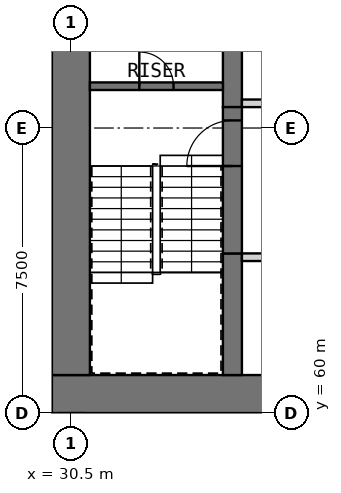
"""IFC4 building model, lengths in metres.
Left out: names, types, materials, properties, quantities, classifications, styles, units other than length and angle.
Written with IfcOpenShell. Run it as: python <this file> out.ifc"""

import sys

from ifc_helpers import new_model, si_unit, direction, frame, frame_2d, origin, place, context, subcontext, project, spatial, rectangle, extrude, element, fill, save


model = new_model("IFC4")
c1 = context("Model", 3, precision=1e-05, world=origin(), true_north=direction((0.0, 1.0)))
c2 = subcontext(c1, "Body", "Model", "MODEL_VIEW")
j1 = project(units=[si_unit("LENGTHUNIT", "METRE"), si_unit("PLANEANGLEUNIT", "RADIAN")], contexts=[c1])
p1 = place(None, origin())
s1 = spatial("IfcSite", under=j1, at=p1, CompositionType="ELEMENT")
p2 = place(p1, origin())
s2 = spatial("IfcBuilding", under=s1, at=p2, CompositionType="ELEMENT")
p3 = place(p2, frame((0.0, 0.0, 44.8)))
s3 = spatial("IfcBuildingStorey", under=s2, at=p3, CompositionType="ELEMENT", Elevation=44.8)
p4 = place(p3, frame((30.0, 60.5, 0.0), z_axis=(0.0, 0.0, 1.0), x_axis=(1.0, 0.0, 0.0)))
e1 = element("IfcWall", 1, at=p4, inside=s3, PredefinedType="SHEAR", context=c2, shape_type="SweptSolid", body=[
    extrude(rectangle(XDim=30.0, YDim=1.0, at=frame_2d((15.0, 0.0))), origin(), (0.0, 0.0, 1.0), 3.6),
])
p5 = place(p4, frame((21.9, 0.0, 0.0)))
e2 = element("IfcOpeningElement", 2, at=p5, cuts=e1, PredefinedType="OPENING", context=c2, shape_type="SweptSolid", body=[
    extrude(rectangle(XDim=1.8, YDim=2.1, at=frame_2d((0.9, 1.05))), frame((0.0, 0.51, 0.0), z_axis=(0.0, -1.0, 0.0), x_axis=(1.0, 0.0, 0.0)), (0.0, 0.0, 1.0), 1.02),
])
p6 = place(p4, frame((26.5, 0.0, 0.0)))
e3 = element("IfcOpeningElement", 3, at=p6, cuts=e1, PredefinedType="OPENING", context=c2, shape_type="SweptSolid", body=[
    extrude(rectangle(XDim=1.2, YDim=2.1, at=frame_2d((0.6, 1.05))), frame((0.0, 0.51, 0.0), z_axis=(0.0, -1.0, 0.0), x_axis=(1.0, 0.0, 0.0)), (0.0, 0.0, 1.0), 1.02),
])
p7 = place(p3, frame((30.5, 61.0, 0.0), z_axis=(0.0, 0.0, 1.0), x_axis=(0.0, 1.0, 0.0)))
e4 = element("IfcWall", 4, at=p7, inside=s3, PredefinedType="SHEAR", context=c2, shape_type="SweptSolid", body=[
    extrude(rectangle(XDim=20.5, YDim=1.0, at=frame_2d((10.25, 0.0))), origin(), (0.0, 0.0, 1.0), 3.6),
])
p8 = place(p3, frame((34.75, 61.0, 0.0), z_axis=(0.0, 0.0, 1.0), x_axis=(0.0, 1.0, 0.0)))
e5 = element("IfcWall", 5, at=p8, inside=s3, PredefinedType="SHEAR", context=c2, shape_type="SweptSolid", body=[
    extrude(rectangle(XDim=3.2, YDim=0.5, at=frame_2d((1.6, 0.0))), origin(), (0.0, 0.0, 1.0), 3.6),
])
p9 = place(p3, frame((34.75, 68.05, 0.0), z_axis=(0.0, 0.0, 1.0), x_axis=(0.0, 1.0, 0.0)))
e6 = element("IfcWall", 6, at=p9, inside=s3, PredefinedType="SHEAR", context=c2, shape_type="SweptSolid", body=[
    extrude(rectangle(XDim=6.4, YDim=0.5, at=frame_2d((3.2, 0.0))), origin(), (0.0, 0.0, 1.0), 3.6),
])
p10 = place(p3, frame((35.0, 64.1, 0.0), z_axis=(0.0, 0.0, 1.0), x_axis=(1.0, 0.0, 0.0)))
e7 = element("IfcWall", 7, at=p10, inside=s3, PredefinedType="SOLIDWALL", context=c2, shape_type="SweptSolid", body=[
    extrude(rectangle(XDim=13.0, YDim=0.2, at=frame_2d((6.5, 0.0))), origin(), (0.0, 0.0, 1.0), 3.6),
])
p11 = place(p10, frame((0.75, 0.0, 0.0)))
e8 = element("IfcOpeningElement", 8, at=p11, cuts=e7, PredefinedType="OPENING", context=c2, shape_type="SweptSolid", body=[
    extrude(rectangle(XDim=1.1, YDim=2.1, at=frame_2d((0.55, 1.05))), frame((0.0, 0.11, 0.0), z_axis=(0.0, -1.0, 0.0), x_axis=(1.0, 0.0, 0.0)), (0.0, 0.0, 1.0), 0.22),
])
p12 = place(p10, frame((3.35, 0.0, 0.0)))
e9 = element("IfcOpeningElement", 9, at=p12, cuts=e7, PredefinedType="OPENING", context=c2, shape_type="SweptSolid", body=[
    extrude(rectangle(XDim=1.1, YDim=2.1, at=frame_2d((0.55, 1.05))), frame((0.0, 0.11, 0.0), z_axis=(0.0, -1.0, 0.0), x_axis=(1.0, 0.0, 0.0)), (0.0, 0.0, 1.0), 0.22),
])
p13 = place(p10, frame((5.95, 0.0, 0.0)))
e10 = element("IfcOpeningElement", 10, at=p13, cuts=e7, PredefinedType="OPENING", context=c2, shape_type="SweptSolid", body=[
    extrude(rectangle(XDim=1.1, YDim=2.1, at=frame_2d((0.55, 1.05))), frame((0.0, 0.11, 0.0), z_axis=(0.0, -1.0, 0.0), x_axis=(1.0, 0.0, 0.0)), (0.0, 0.0, 1.0), 0.22),
])
p14 = place(p10, frame((8.55, 0.0, 0.0)))
e11 = element("IfcOpeningElement", 11, at=p14, cuts=e7, PredefinedType="OPENING", context=c2, shape_type="SweptSolid", body=[
    extrude(rectangle(XDim=1.1, YDim=2.1, at=frame_2d((0.55, 1.05))), frame((0.0, 0.11, 0.0), z_axis=(0.0, -1.0, 0.0), x_axis=(1.0, 0.0, 0.0)), (0.0, 0.0, 1.0), 0.22),
])
p15 = place(p10, frame((11.15, 0.0, 0.0)))
e12 = element("IfcOpeningElement", 12, at=p15, cuts=e7, PredefinedType="OPENING", context=c2, shape_type="SweptSolid", body=[
    extrude(rectangle(XDim=1.1, YDim=2.1, at=frame_2d((0.55, 1.05))), frame((0.0, 0.11, 0.0), z_axis=(0.0, -1.0, 0.0), x_axis=(1.0, 0.0, 0.0)), (0.0, 0.0, 1.0), 0.22),
])
p16 = place(p3, frame((35.0, 68.15, 0.0), z_axis=(0.0, 0.0, 1.0), x_axis=(1.0, 0.0, 0.0)))
e13 = element("IfcWall", 13, at=p16, inside=s3, PredefinedType="SOLIDWALL", context=c2, shape_type="SweptSolid", body=[
    extrude(rectangle(XDim=13.0, YDim=0.2, at=frame_2d((6.5, 0.0))), origin(), (0.0, 0.0, 1.0), 3.6),
])
p17 = place(p16, frame((0.75, 0.0, 0.0)))
e14 = element("IfcOpeningElement", 14, at=p17, cuts=e13, PredefinedType="OPENING", context=c2, shape_type="SweptSolid", body=[
    extrude(rectangle(XDim=1.1, YDim=2.1, at=frame_2d((0.55, 1.05))), frame((0.0, 0.11, 0.0), z_axis=(0.0, -1.0, 0.0), x_axis=(1.0, 0.0, 0.0)), (0.0, 0.0, 1.0), 0.22),
])
p18 = place(p3, frame((34.75, 64.2, 0.0), z_axis=(0.0, 0.0, 1.0), x_axis=(0.0, 1.0, 0.0)))
e15 = element("IfcWall", 15, at=p18, inside=s3, PredefinedType="SOLIDWALL", context=c2, shape_type="SweptSolid", body=[
    extrude(rectangle(XDim=3.85, YDim=0.5, at=frame_2d((1.925, 0.0))), origin(), (0.0, 0.0, 1.0), 2.4),
])
p19 = place(p18, frame((2.3, 0.0, 0.0)))
e16 = element("IfcOpeningElement", 16, at=p19, cuts=e15, PredefinedType="OPENING", context=c2, shape_type="SweptSolid", body=[
    extrude(rectangle(XDim=1.2, YDim=2.1, at=frame_2d((0.6, 1.05))), frame((0.0, 0.26, 0.0), z_axis=(0.0, -1.0, 0.0), x_axis=(1.0, 0.0, 0.0)), (0.0, 0.0, 1.0), 0.52),
])
p20 = place(p3, frame((31.0, 68.6, 0.0), z_axis=(0.0, 0.0, 1.0), x_axis=(1.0, 0.0, 0.0)))
e17 = element("IfcWall", 17, at=p20, inside=s3, PredefinedType="SOLIDWALL", context=c2, shape_type="SweptSolid", body=[
    extrude(rectangle(XDim=3.5, YDim=0.2, at=frame_2d((1.75, 0.0))), origin(), (0.0, 0.0, 1.0), 3.35),
])
p21 = place(p20, frame((1.3, 0.0, 0.0)))
e18 = element("IfcOpeningElement", 18, at=p21, cuts=e17, PredefinedType="OPENING", context=c2, shape_type="SweptSolid", body=[
    extrude(rectangle(XDim=0.9, YDim=2.1, at=frame_2d((0.45, 1.05))), frame((0.0, 0.11, 0.0), z_axis=(0.0, -1.0, 0.0), x_axis=(1.0, 0.0, 0.0)), (0.0, 0.0, 1.0), 0.22),
])
p22 = place(p19, origin())
e19 = element("IfcDoor", 19, at=p22, inside=s3, OperationType="SINGLE_SWING_LEFT", PredefinedType="DOOR", context=c2, shape_type="SweptSolid", body=[
    extrude(rectangle(XDim=1.2, YDim=2.1, at=frame_2d((0.6, 1.05))), frame((0.0, 0.025, 0.0), z_axis=(0.0, -1.0, 0.0), x_axis=(1.0, 0.0, 0.0)), (0.0, 0.0, 1.0), 0.05),
])
fill(e16, e19)
p23 = place(p21, origin())
e20 = element("IfcDoor", 20, at=p23, inside=s3, OperationType="SINGLE_SWING_LEFT", PredefinedType="DOOR", context=c2, shape_type="SweptSolid", body=[
    extrude(rectangle(XDim=0.9, YDim=2.1, at=frame_2d((0.45, 1.05))), frame((0.0, 0.025, 0.0), z_axis=(0.0, -1.0, 0.0), x_axis=(1.0, 0.0, 0.0)), (0.0, 0.0, 1.0), 0.05),
])
fill(e18, e20)
save(model, sys.argv[1])
